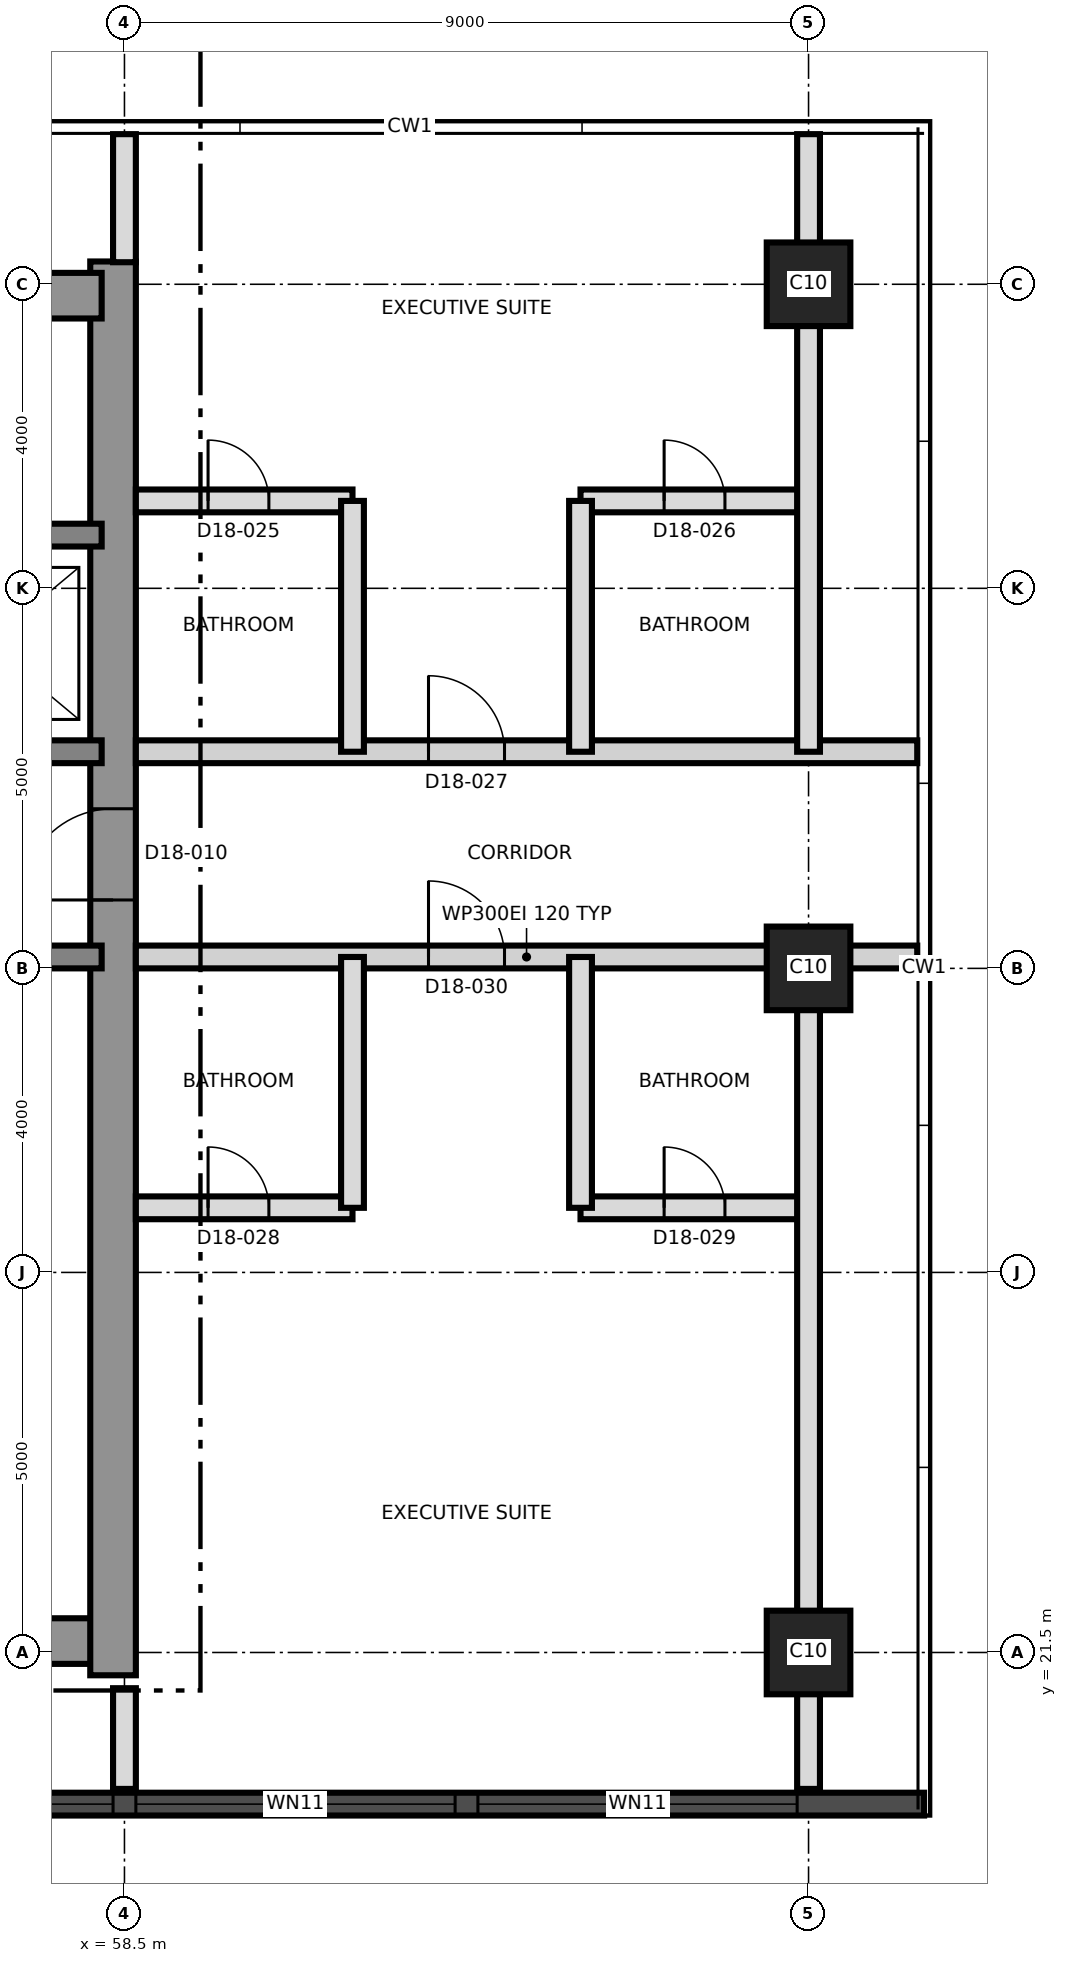
"""IFC4 building model, lengths in metres.
Left out: names, types, materials, properties, quantities, classifications, styles, units other than length and angle.
Written with IfcOpenShell. Run it as: python <this file> out.ifc"""

import sys

from ifc_helpers import new_model, si_unit, direction, frame, frame_2d, origin, origin_2d, place, context, subcontext, project, spatial, rectangle, extrude, element, fill, save


model = new_model("IFC4")
c1 = context("Model", 3, precision=1e-05, world=origin(), true_north=direction((0.0, 1.0)))
c2 = subcontext(c1, "Body", "Model", "MODEL_VIEW")
j1 = project(units=[si_unit("LENGTHUNIT", "METRE"), si_unit("PLANEANGLEUNIT", "RADIAN")], contexts=[c1])
p1 = place(None, origin())
s1 = spatial("IfcSite", under=j1, at=p1, CompositionType="ELEMENT")
p2 = place(p1, origin())
s2 = spatial("IfcBuilding", under=s1, at=p2, CompositionType="ELEMENT")
p3 = place(p2, frame((0.0, 0.0, 175.5)))
s3 = spatial("IfcBuildingStorey", under=s2, at=p3, CompositionType="ELEMENT", Elevation=175.5)
p4 = place(p3, frame((31.2, 21.65, 0.0), z_axis=(0.0, 0.0, 1.0), x_axis=(1.0, 0.0, 0.0)))
e1 = element("IfcWall", 1, at=p4, inside=s3, PredefinedType="SHEAR", context=c2, shape_type="SweptSolid", body=[
    extrude(rectangle(XDim=27.0, YDim=0.6, at=frame_2d((13.5, 0.0))), origin(), (0.0, 0.0, 1.0), 3.7),
])
p5 = place(p3, frame((58.35, 21.2, 0.0), z_axis=(0.0, 0.0, 1.0), x_axis=(0.0, 1.0, 0.0)))
e2 = element("IfcWall", 2, at=p5, inside=s3, PredefinedType="SHEAR", context=c2, shape_type="SweptSolid", body=[
    extrude(rectangle(XDim=18.6, YDim=0.6, at=frame_2d((9.3, 0.0))), origin(), (0.0, 0.0, 1.0), 3.7),
])
p6 = place(p5, frame((10.2, 0.0, 0.0)))
e3 = element("IfcOpeningElement", 3, at=p6, cuts=e2, PredefinedType="OPENING", context=c2, shape_type="SweptSolid", body=[
    extrude(rectangle(XDim=1.2, YDim=2.1, at=frame_2d((0.6, 1.05))), frame((0.0, 0.31, 0.0), z_axis=(0.0, -1.0, 0.0), x_axis=(1.0, 0.0, 0.0)), (0.0, 0.0, 1.0), 0.62),
])
p7 = place(p3, frame((31.2, 39.35, 0.0), z_axis=(0.0, 0.0, 1.0), x_axis=(1.0, 0.0, 0.0)))
e4 = element("IfcWall", 4, at=p7, inside=s3, PredefinedType="SHEAR", context=c2, shape_type="SweptSolid", body=[
    extrude(rectangle(XDim=27.0, YDim=0.6, at=frame_2d((13.5, 0.0))), origin(), (0.0, 0.0, 1.0), 3.7),
])
p8 = place(p7, frame((10.5, 0.0, 0.0)))
e5 = element("IfcOpeningElement", 5, at=p8, cuts=e4, PredefinedType="OPENING", context=c2, shape_type="SweptSolid", body=[
    extrude(rectangle(XDim=1.2, YDim=2.1, at=frame_2d((0.6, 1.05))), frame((0.0, 0.31, 0.0), z_axis=(0.0, -1.0, 0.0), x_axis=(1.0, 0.0, 0.0)), (0.0, 0.0, 1.0), 0.62),
])
p9 = place(p3, frame((31.8, 30.65, 0.0), z_axis=(0.0, 0.0, 1.0), x_axis=(1.0, 0.0, 0.0)))
e6 = element("IfcWall", 6, at=p9, inside=s3, PredefinedType="SHEAR", context=c2, shape_type="SweptSolid", body=[
    extrude(rectangle(XDim=26.4, YDim=0.3, at=frame_2d((13.2, 0.0))), origin(), (0.0, 0.0, 1.0), 3.7),
])
p10 = place(p9, frame((24.7, 0.0, 0.0)))
e7 = element("IfcOpeningElement", 7, at=p10, cuts=e6, PredefinedType="OPENING", context=c2, shape_type="SweptSolid", body=[
    extrude(rectangle(XDim=1.0, YDim=2.1, at=frame_2d((0.5, 1.05))), frame((0.0, 0.16, 0.0), z_axis=(0.0, -1.0, 0.0), x_axis=(1.0, 0.0, 0.0)), (0.0, 0.0, 1.0), 0.32),
])
p11 = place(p3, frame((31.8, 33.35, 0.0), z_axis=(0.0, 0.0, 1.0), x_axis=(1.0, 0.0, 0.0)))
e8 = element("IfcWall", 8, at=p11, inside=s3, PredefinedType="SHEAR", context=c2, shape_type="SweptSolid", body=[
    extrude(rectangle(XDim=26.4, YDim=0.3, at=frame_2d((13.2, 0.0))), origin(), (0.0, 0.0, 1.0), 3.7),
])
p12 = place(p11, frame((13.85, 0.0, 0.0)))
e9 = element("IfcOpeningElement", 9, at=p12, cuts=e8, PredefinedType="OPENING", context=c2, shape_type="SweptSolid", body=[
    extrude(rectangle(XDim=1.4, YDim=2.1, at=frame_2d((0.7, 1.05))), frame((0.0, 0.16, 0.0), z_axis=(0.0, -1.0, 0.0), x_axis=(1.0, 0.0, 0.0)), (0.0, 0.0, 1.0), 0.32),
])
p13 = place(p11, frame((5.325, 0.0, 0.0)))
e10 = element("IfcOpeningElement", 10, at=p13, cuts=e8, PredefinedType="OPENING", context=c2, shape_type="SweptSolid", body=[
    extrude(rectangle(XDim=1.2, YDim=2.1, at=frame_2d((0.6, 1.05))), frame((0.0, 0.16, 0.0), z_axis=(0.0, -1.0, 0.0), x_axis=(1.0, 0.0, 0.0)), (0.0, 0.0, 1.0), 0.32),
])
p14 = place(p11, frame((19.875, 0.0, 0.0)))
e11 = element("IfcOpeningElement", 11, at=p14, cuts=e8, PredefinedType="OPENING", context=c2, shape_type="SweptSolid", body=[
    extrude(rectangle(XDim=1.2, YDim=2.1, at=frame_2d((0.6, 1.05))), frame((0.0, 0.16, 0.0), z_axis=(0.0, -1.0, 0.0), x_axis=(1.0, 0.0, 0.0)), (0.0, 0.0, 1.0), 0.32),
])
p15 = place(p3, frame((43.5, 36.2, 0.0), z_axis=(0.0, 0.0, 1.0), x_axis=(1.0, 0.0, 0.0)))
e12 = element("IfcWall", 12, at=p15, inside=s3, PredefinedType="SHEAR", context=c2, shape_type="SweptSolid", body=[
    extrude(rectangle(XDim=14.7, YDim=0.3, at=frame_2d((7.35, 0.0))), origin(), (0.0, 0.0, 1.0), 3.7),
])
p16 = place(p15, frame((6.9, 0.0, 0.0)))
e13 = element("IfcOpeningElement", 13, at=p16, cuts=e12, PredefinedType="OPENING", context=c2, shape_type="SweptSolid", body=[
    extrude(rectangle(XDim=1.2, YDim=2.1, at=frame_2d((0.6, 1.05))), frame((0.0, 0.16, 0.0), z_axis=(0.0, -1.0, 0.0), x_axis=(1.0, 0.0, 0.0)), (0.0, 0.0, 1.0), 0.32),
])
p17 = place(p15, frame((0.7, 0.0, 0.0)))
e14 = element("IfcOpeningElement", 14, at=p17, cuts=e12, PredefinedType="OPENING", context=c2, shape_type="SweptSolid", body=[
    extrude(rectangle(XDim=1.3, YDim=2.4, at=frame_2d((0.65, 1.2))), frame((0.0, 0.16, 0.0), z_axis=(0.0, -1.0, 0.0), x_axis=(1.0, 0.0, 0.0)), (0.0, 0.0, 1.0), 0.32),
])
p18 = place(p15, frame((3.7, 0.0, 0.0)))
e15 = element("IfcOpeningElement", 15, at=p18, cuts=e12, PredefinedType="OPENING", context=c2, shape_type="SweptSolid", body=[
    extrude(rectangle(XDim=1.3, YDim=2.4, at=frame_2d((0.65, 1.2))), frame((0.0, 0.16, 0.0), z_axis=(0.0, -1.0, 0.0), x_axis=(1.0, 0.0, 0.0)), (0.0, 0.0, 1.0), 0.32),
])
for number, where, z_axis, x_axis in (
    (16, (67.5, 21.5, 0.0), (0.0, 0.0, 1.0), (1.0, 0.0, 0.0)),
    (17, (67.5, 30.5, 0.0), (0.0, 0.0, 1.0), (1.0, 0.0, 0.0)),
    (18, (67.5, 39.5, 0.0), (0.0, 0.0, 1.0), (1.0, 0.0, 0.0)),
):
    element("IfcColumn", number, at=place(p3, frame(where, z_axis=z_axis, x_axis=x_axis)), inside=s3, PredefinedType="COLUMN", context=c2, shape_type="SweptSolid", body=[
        extrude(rectangle(XDim=1.1, YDim=1.1, at=origin_2d()), origin(), (0.0, 0.0, 1.0), 3.7),
    ])
p19 = place(p3, frame((44.01, 19.505, 0.0), z_axis=(0.0, 0.0, 1.0), x_axis=(1.0, 0.0, 0.0)))
e19 = element("IfcWall", 19, at=p19, inside=s3, PredefinedType="SOLIDWALL", context=c2, shape_type="SweptSolid", body=[
    extrude(rectangle(XDim=25.01, YDim=0.3, at=frame_2d((12.505, 0.0))), origin(), (0.0, 0.0, 1.0), 3.4),
])
p20 = place(p19, frame((1.845, 0.0, 0.3)))
e20 = element("IfcOpeningElement", 20, at=p20, cuts=e19, PredefinedType="OPENING", context=c2, shape_type="SweptSolid", body=[
    extrude(rectangle(XDim=1.8, YDim=2.4, at=frame_2d((0.9, 1.2))), frame((0.0, 0.16, 0.0), z_axis=(0.0, -1.0, 0.0), x_axis=(1.0, 0.0, 0.0)), (0.0, 0.0, 1.0), 0.32),
])
p21 = place(p19, frame((5.64, 0.0, 0.9)))
e21 = element("IfcOpeningElement", 21, at=p21, cuts=e19, PredefinedType="OPENING", context=c2, shape_type="SweptSolid", body=[
    extrude(rectangle(XDim=4.2, YDim=1.5, at=frame_2d((2.1, 0.75))), frame((0.0, 0.16, 0.0), z_axis=(0.0, -1.0, 0.0), x_axis=(1.0, 0.0, 0.0)), (0.0, 0.0, 1.0), 0.32),
])
p22 = place(p19, frame((10.14, 0.0, 0.9)))
e22 = element("IfcOpeningElement", 22, at=p22, cuts=e19, PredefinedType="OPENING", context=c2, shape_type="SweptSolid", body=[
    extrude(rectangle(XDim=4.2, YDim=1.5, at=frame_2d((2.1, 0.75))), frame((0.0, 0.16, 0.0), z_axis=(0.0, -1.0, 0.0), x_axis=(1.0, 0.0, 0.0)), (0.0, 0.0, 1.0), 0.32),
])
p23 = place(p19, frame((14.64, 0.0, 0.9)))
e23 = element("IfcOpeningElement", 23, at=p23, cuts=e19, PredefinedType="OPENING", context=c2, shape_type="SweptSolid", body=[
    extrude(rectangle(XDim=4.2, YDim=1.5, at=frame_2d((2.1, 0.75))), frame((0.0, 0.16, 0.0), z_axis=(0.0, -1.0, 0.0), x_axis=(1.0, 0.0, 0.0)), (0.0, 0.0, 1.0), 0.32),
])
p24 = place(p19, frame((19.14, 0.0, 0.9)))
e24 = element("IfcOpeningElement", 24, at=p24, cuts=e19, PredefinedType="OPENING", context=c2, shape_type="SweptSolid", body=[
    extrude(rectangle(XDim=4.2, YDim=1.5, at=frame_2d((2.1, 0.75))), frame((0.0, 0.16, 0.0), z_axis=(0.0, -1.0, 0.0), x_axis=(1.0, 0.0, 0.0)), (0.0, 0.0, 1.0), 0.32),
])
p25 = place(p3, frame((58.65, 27.35, 0.0), z_axis=(0.0, 0.0, 1.0), x_axis=(1.0, 0.0, 0.0)))
e25 = element("IfcWall", 25, at=p25, inside=s3, PredefinedType="PARTITIONING", context=c2, shape_type="SweptSolid", body=[
    extrude(rectangle(XDim=2.85, YDim=0.3, at=frame_2d((1.425, 0.0))), origin(), (0.0, 0.0, 1.0), 3.4),
])
p26 = place(p25, frame((0.95, 0.0, 0.0)))
e26 = element("IfcOpeningElement", 26, at=p26, cuts=e25, PredefinedType="OPENING", context=c2, shape_type="SweptSolid", body=[
    extrude(rectangle(XDim=0.8, YDim=2.1, at=frame_2d((0.4, 1.05))), frame((0.0, 0.16, 0.0), z_axis=(0.0, -1.0, 0.0), x_axis=(1.0, 0.0, 0.0)), (0.0, 0.0, 1.0), 0.32),
])
p27 = place(p3, frame((64.5, 27.35, 0.0), z_axis=(0.0, 0.0, 1.0), x_axis=(1.0, 0.0, 0.0)))
e27 = element("IfcWall", 27, at=p27, inside=s3, PredefinedType="PARTITIONING", context=c2, shape_type="SweptSolid", body=[
    extrude(rectangle(XDim=3.0, YDim=0.3, at=frame_2d((1.5, 0.0))), origin(), (0.0, 0.0, 1.0), 3.4),
])
p28 = place(p27, frame((1.1, 0.0, 0.0)))
e28 = element("IfcOpeningElement", 28, at=p28, cuts=e27, PredefinedType="OPENING", context=c2, shape_type="SweptSolid", body=[
    extrude(rectangle(XDim=0.8, YDim=2.1, at=frame_2d((0.4, 1.05))), frame((0.0, 0.16, 0.0), z_axis=(0.0, -1.0, 0.0), x_axis=(1.0, 0.0, 0.0)), (0.0, 0.0, 1.0), 0.32),
])
p29 = place(p3, frame((58.65, 30.65, 0.0), z_axis=(0.0, 0.0, 1.0), x_axis=(1.0, 0.0, 0.0)))
e29 = element("IfcWall", 29, at=p29, inside=s3, PredefinedType="PARTITIONING", context=c2, shape_type="SweptSolid", body=[
    extrude(rectangle(XDim=10.28, YDim=0.3, at=frame_2d((5.14, 0.0))), origin(), (0.0, 0.0, 1.0), 2.8),
])
p30 = place(p29, frame((3.85, 0.0, 0.0)))
e30 = element("IfcOpeningElement", 30, at=p30, cuts=e29, PredefinedType="OPENING", context=c2, shape_type="SweptSolid", body=[
    extrude(rectangle(XDim=1.0, YDim=2.4, at=frame_2d((0.5, 1.2))), frame((0.0, 0.16, 0.0), z_axis=(0.0, -1.0, 0.0), x_axis=(1.0, 0.0, 0.0)), (0.0, 0.0, 1.0), 0.32),
])
p31 = place(p3, frame((58.65, 33.35, 0.0), z_axis=(0.0, 0.0, 1.0), x_axis=(1.0, 0.0, 0.0)))
e31 = element("IfcWall", 31, at=p31, inside=s3, PredefinedType="PARTITIONING", context=c2, shape_type="SweptSolid", body=[
    extrude(rectangle(XDim=10.28, YDim=0.3, at=frame_2d((5.14, 0.0))), origin(), (0.0, 0.0, 1.0), 3.4),
])
p32 = place(p31, frame((3.85, 0.0, 0.0)))
e32 = element("IfcOpeningElement", 32, at=p32, cuts=e31, PredefinedType="OPENING", context=c2, shape_type="SweptSolid", body=[
    extrude(rectangle(XDim=1.0, YDim=2.4, at=frame_2d((0.5, 1.2))), frame((0.0, 0.16, 0.0), z_axis=(0.0, -1.0, 0.0), x_axis=(1.0, 0.0, 0.0)), (0.0, 0.0, 1.0), 0.32),
])
p33 = place(p3, frame((58.65, 36.65, 0.0), z_axis=(0.0, 0.0, 1.0), x_axis=(1.0, 0.0, 0.0)))
e33 = element("IfcWall", 33, at=p33, inside=s3, PredefinedType="PARTITIONING", context=c2, shape_type="SweptSolid", body=[
    extrude(rectangle(XDim=2.85, YDim=0.3, at=frame_2d((1.425, 0.0))), origin(), (0.0, 0.0, 1.0), 3.4),
])
p34 = place(p33, frame((0.95, 0.0, 0.0)))
e34 = element("IfcOpeningElement", 34, at=p34, cuts=e33, PredefinedType="OPENING", context=c2, shape_type="SweptSolid", body=[
    extrude(rectangle(XDim=0.8, YDim=2.1, at=frame_2d((0.4, 1.05))), frame((0.0, 0.16, 0.0), z_axis=(0.0, -1.0, 0.0), x_axis=(1.0, 0.0, 0.0)), (0.0, 0.0, 1.0), 0.32),
])
p35 = place(p3, frame((64.5, 36.65, 0.0), z_axis=(0.0, 0.0, 1.0), x_axis=(1.0, 0.0, 0.0)))
e35 = element("IfcWall", 35, at=p35, inside=s3, PredefinedType="PARTITIONING", context=c2, shape_type="SweptSolid", body=[
    extrude(rectangle(XDim=3.0, YDim=0.3, at=frame_2d((1.5, 0.0))), origin(), (0.0, 0.0, 1.0), 3.4),
])
p36 = place(p35, frame((1.1, 0.0, 0.0)))
e36 = element("IfcOpeningElement", 36, at=p36, cuts=e35, PredefinedType="OPENING", context=c2, shape_type="SweptSolid", body=[
    extrude(rectangle(XDim=0.8, YDim=2.1, at=frame_2d((0.4, 1.05))), frame((0.0, 0.16, 0.0), z_axis=(0.0, -1.0, 0.0), x_axis=(1.0, 0.0, 0.0)), (0.0, 0.0, 1.0), 0.32),
])
p37 = place(p3, frame((58.5, 19.705, 0.0), z_axis=(0.0, 0.0, 1.0), x_axis=(0.0, 1.0, 0.0)))
e37 = element("IfcWall", 37, at=p37, inside=s3, PredefinedType="PARTITIONING", context=c2, shape_type="SweptSolid", body=[
    extrude(rectangle(XDim=1.325, YDim=0.3, at=frame_2d((0.663, 0.0))), origin(), (0.0, 0.0, 1.0), 3.4),
])
p38 = place(p3, frame((58.5, 39.79, 0.0), z_axis=(0.0, 0.0, 1.0), x_axis=(0.0, 1.0, 0.0)))
e38 = element("IfcWall", 38, at=p38, inside=s3, PredefinedType="PARTITIONING", context=c2, shape_type="SweptSolid", body=[
    extrude(rectangle(XDim=1.685, YDim=0.3, at=frame_2d((0.843, 0.0))), origin(), (0.0, 0.0, 1.0), 3.4),
])
for number, where, z_axis, x_axis in (
    (39, (61.5, 27.35, 0.0), (0.0, 0.0, 1.0), (0.0, 1.0, 0.0)),
    (40, (61.5, 33.35, 0.0), (0.0, 0.0, 1.0), (0.0, 1.0, 0.0)),
    (41, (64.5, 27.35, 0.0), (0.0, 0.0, 1.0), (0.0, 1.0, 0.0)),
    (42, (64.5, 33.35, 0.0), (0.0, 0.0, 1.0), (0.0, 1.0, 0.0)),
):
    element("IfcWall", number, at=place(p3, frame(where, z_axis=z_axis, x_axis=x_axis)), inside=s3, PredefinedType="PARTITIONING", context=c2, shape_type="SweptSolid", body=[
        extrude(rectangle(XDim=3.3, YDim=0.3, at=frame_2d((1.65, 0.0))), origin(), (0.0, 0.0, 1.0), 3.4),
    ])
p39 = place(p3, frame((67.5, 19.705, 0.0), z_axis=(0.0, 0.0, 1.0), x_axis=(0.0, 1.0, 0.0)))
e43 = element("IfcWall", 43, at=p39, inside=s3, PredefinedType="PARTITIONING", context=c2, shape_type="SweptSolid", body=[
    extrude(rectangle(XDim=10.945, YDim=0.3, at=frame_2d((5.472, 0.0))), origin(), (0.0, 0.0, 1.0), 2.8),
])
p40 = place(p3, frame((67.5, 33.35, 0.0), z_axis=(0.0, 0.0, 1.0), x_axis=(0.0, 1.0, 0.0)))
e44 = element("IfcWall", 44, at=p40, inside=s3, PredefinedType="PARTITIONING", context=c2, shape_type="SweptSolid", body=[
    extrude(rectangle(XDim=8.125, YDim=0.3, at=frame_2d((4.062, 0.0))), origin(), (0.0, 0.0, 1.0), 2.8),
])
p41 = place(p22, origin())
e45 = element("IfcWindow", 45, at=p41, inside=s3, PartitioningType="SINGLE_PANEL", PredefinedType="WINDOW", context=c2, shape_type="SweptSolid", body=[
    extrude(rectangle(XDim=4.2, YDim=1.5, at=frame_2d((2.1, 0.75))), frame((0.0, 0.03, 0.0), z_axis=(0.0, -1.0, 0.0), x_axis=(1.0, 0.0, 0.0)), (0.0, 0.0, 1.0), 0.06),
])
fill(e22, e45)
p42 = place(p23, origin())
e46 = element("IfcWindow", 46, at=p42, inside=s3, PartitioningType="SINGLE_PANEL", PredefinedType="WINDOW", context=c2, shape_type="SweptSolid", body=[
    extrude(rectangle(XDim=4.2, YDim=1.5, at=frame_2d((2.1, 0.75))), frame((0.0, 0.03, 0.0), z_axis=(0.0, -1.0, 0.0), x_axis=(1.0, 0.0, 0.0)), (0.0, 0.0, 1.0), 0.06),
])
fill(e23, e46)
p43 = place(p24, origin())
e47 = element("IfcWindow", 47, at=p43, inside=s3, PartitioningType="SINGLE_PANEL", PredefinedType="WINDOW", context=c2, shape_type="SweptSolid", body=[
    extrude(rectangle(XDim=4.2, YDim=1.5, at=frame_2d((2.1, 0.75))), frame((0.0, 0.03, 0.0), z_axis=(0.0, -1.0, 0.0), x_axis=(1.0, 0.0, 0.0)), (0.0, 0.0, 1.0), 0.06),
])
fill(e24, e47)
p44 = place(p6, origin())
e48 = element("IfcDoor", 48, at=p44, inside=s3, OperationType="SINGLE_SWING_LEFT", PredefinedType="DOOR", context=c2, shape_type="SweptSolid", body=[
    extrude(rectangle(XDim=1.2, YDim=2.1, at=frame_2d((0.6, 1.05))), frame((0.0, 0.025, 0.0), z_axis=(0.0, -1.0, 0.0), x_axis=(1.0, 0.0, 0.0)), (0.0, 0.0, 1.0), 0.05),
])
fill(e3, e48)
p45 = place(p34, origin())
e49 = element("IfcDoor", 49, at=p45, inside=s3, OperationType="SINGLE_SWING_LEFT", PredefinedType="DOOR", context=c2, shape_type="SweptSolid", body=[
    extrude(rectangle(XDim=0.8, YDim=2.1, at=frame_2d((0.4, 1.05))), frame((0.0, 0.025, 0.0), z_axis=(0.0, -1.0, 0.0), x_axis=(1.0, 0.0, 0.0)), (0.0, 0.0, 1.0), 0.05),
])
fill(e34, e49)
p46 = place(p36, origin())
e50 = element("IfcDoor", 50, at=p46, inside=s3, OperationType="SINGLE_SWING_RIGHT", PredefinedType="DOOR", context=c2, shape_type="SweptSolid", body=[
    extrude(rectangle(XDim=0.8, YDim=2.1, at=frame_2d((0.4, 1.05))), frame((0.0, 0.025, 0.0), z_axis=(0.0, -1.0, 0.0), x_axis=(1.0, 0.0, 0.0)), (0.0, 0.0, 1.0), 0.05),
])
fill(e36, e50)
p47 = place(p32, origin())
e51 = element("IfcDoor", 51, at=p47, inside=s3, OperationType="SINGLE_SWING_LEFT", PredefinedType="DOOR", context=c2, shape_type="SweptSolid", body=[
    extrude(rectangle(XDim=1.0, YDim=2.4, at=frame_2d((0.5, 1.2))), frame((0.0, 0.025, 0.0), z_axis=(0.0, -1.0, 0.0), x_axis=(1.0, 0.0, 0.0)), (0.0, 0.0, 1.0), 0.05),
])
fill(e32, e51)
p48 = place(p26, origin())
e52 = element("IfcDoor", 52, at=p48, inside=s3, OperationType="SINGLE_SWING_LEFT", PredefinedType="DOOR", context=c2, shape_type="SweptSolid", body=[
    extrude(rectangle(XDim=0.8, YDim=2.1, at=frame_2d((0.4, 1.05))), frame((0.0, 0.025, 0.0), z_axis=(0.0, -1.0, 0.0), x_axis=(1.0, 0.0, 0.0)), (0.0, 0.0, 1.0), 0.05),
])
fill(e26, e52)
p49 = place(p28, origin())
e53 = element("IfcDoor", 53, at=p49, inside=s3, OperationType="SINGLE_SWING_RIGHT", PredefinedType="DOOR", context=c2, shape_type="SweptSolid", body=[
    extrude(rectangle(XDim=0.8, YDim=2.1, at=frame_2d((0.4, 1.05))), frame((0.0, 0.025, 0.0), z_axis=(0.0, -1.0, 0.0), x_axis=(1.0, 0.0, 0.0)), (0.0, 0.0, 1.0), 0.05),
])
fill(e28, e53)
p50 = place(p30, origin())
e54 = element("IfcDoor", 54, at=p50, inside=s3, OperationType="SINGLE_SWING_LEFT", PredefinedType="DOOR", context=c2, shape_type="SweptSolid", body=[
    extrude(rectangle(XDim=1.0, YDim=2.4, at=frame_2d((0.5, 1.2))), frame((0.0, 0.025, 0.0), z_axis=(0.0, -1.0, 0.0), x_axis=(1.0, 0.0, 0.0)), (0.0, 0.0, 1.0), 0.05),
])
fill(e30, e54)
save(model, sys.argv[1])
